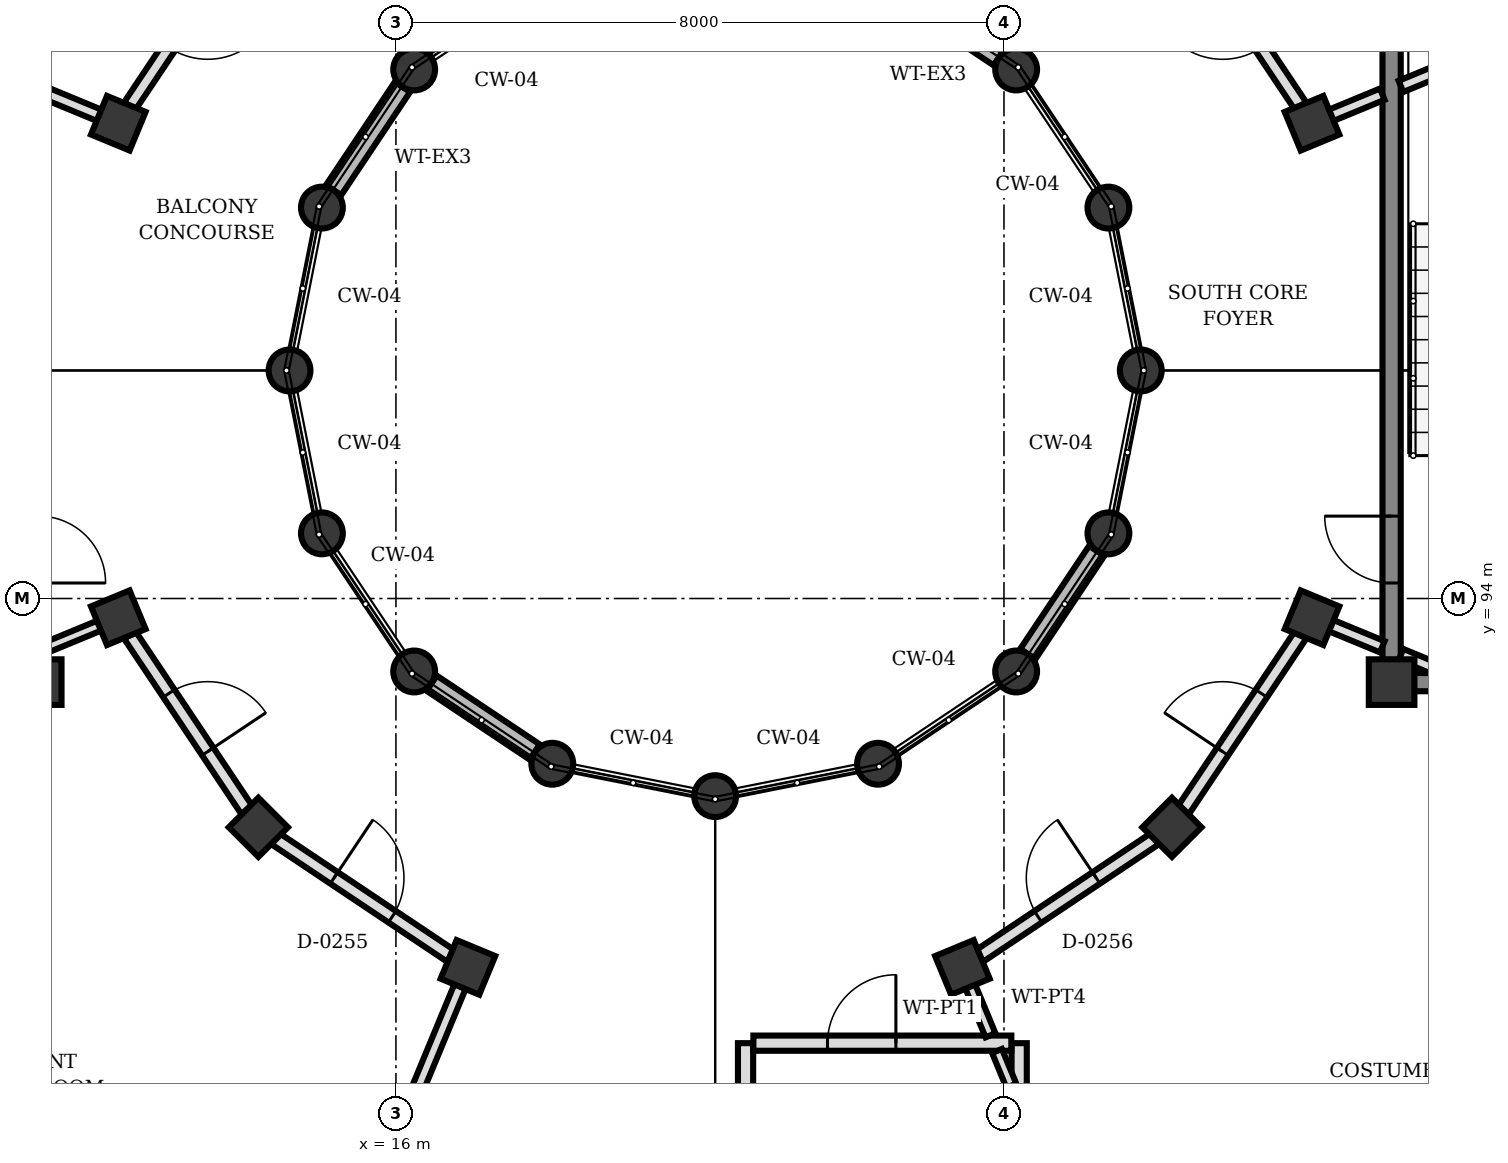
"""IFC4 building model, lengths in metres.
Left out: names, types, materials, properties, quantities, classifications, styles, units other than length and angle.
Written with IfcOpenShell. Run it as: python <this file> out.ifc"""

import sys

from ifc_helpers import new_model, si_unit, direction, frame, frame_2d, origin, origin_2d, place, context, subcontext, project, spatial, rectangle, circle, extrude, element, fill, save


model = new_model("IFC4")
c1 = context("Model", 3, precision=1e-05, world=origin(), true_north=direction((0.0, 1.0)))
c2 = subcontext(c1, "Body", "Model", "MODEL_VIEW")
j1 = project(units=[si_unit("LENGTHUNIT", "METRE"), si_unit("PLANEANGLEUNIT", "RADIAN")], contexts=[c1])
p1 = place(None, origin())
s1 = spatial("IfcSite", under=j1, at=p1, CompositionType="ELEMENT")
p2 = place(p1, origin())
s2 = spatial("IfcBuilding", under=s1, at=p2, CompositionType="ELEMENT")
p3 = place(p2, frame((0.0, 0.0, 4.5)))
s3 = spatial("IfcBuildingStorey", under=s2, at=p3, CompositionType="ELEMENT", Elevation=4.5)
for number, where, z_axis, x_axis in (
    (1, (11.3, 92.9, 0.0), (0.0, 0.0, 1.0), (1.0, 0.0, 0.0)),
    (2, (29.1, 92.9, 0.0), (0.0, 0.0, 1.0), (1.0, 0.0, 0.0)),
):
    element("IfcColumn", number, at=place(p3, frame(where, z_axis=z_axis, x_axis=x_axis)), inside=s3, PredefinedType="COLUMN", context=c2, shape_type="SweptSolid", body=[
        extrude(rectangle(XDim=0.6, YDim=0.6, at=origin_2d()), origin(), (0.0, 0.0, 1.0), 4.0),
    ])
for number, where, z_axis, x_axis in (
    (3, (25.8, 97.0, 0.0), (0.0, 0.0, 1.0), (1.0, 0.0, 0.0)),
    (4, (25.374, 99.143, 0.0), (0.0, 0.0, 1.0), (1.0, 0.0, 0.0)),
    (5, (24.16, 100.96, 0.0), (0.0, 0.0, 1.0), (1.0, 0.0, 0.0)),
    (6, (16.24, 100.96, 0.0), (0.0, 0.0, 1.0), (1.0, 0.0, 0.0)),
    (7, (15.026, 99.143, 0.0), (0.0, 0.0, 1.0), (1.0, 0.0, 0.0)),
    (8, (14.6, 97.0, 0.0), (0.0, 0.0, 1.0), (1.0, 0.0, 0.0)),
    (9, (15.026, 94.857, 0.0), (0.0, 0.0, 1.0), (1.0, 0.0, 0.0)),
    (10, (16.24, 93.04, 0.0), (0.0, 0.0, 1.0), (1.0, 0.0, 0.0)),
    (11, (18.057, 91.826, 0.0), (0.0, 0.0, 1.0), (1.0, 0.0, 0.0)),
    (12, (20.2, 91.4, 0.0), (0.0, 0.0, 1.0), (1.0, 0.0, 0.0)),
    (13, (22.343, 91.826, 0.0), (0.0, 0.0, 1.0), (1.0, 0.0, 0.0)),
    (14, (24.16, 93.04, 0.0), (0.0, 0.0, 1.0), (1.0, 0.0, 0.0)),
    (15, (25.374, 94.857, 0.0), (0.0, 0.0, 1.0), (1.0, 0.0, 0.0)),
):
    element("IfcColumn", number, at=place(p3, frame(where, z_axis=z_axis, x_axis=x_axis)), inside=s3, PredefinedType="COLUMN", context=c2, shape_type="SweptSolid", body=[
        extrude(circle(Radius=0.275, at=origin_2d()), origin(), (0.0, 0.0, 1.0), 4.0),
    ])
for number, where, z_axis, x_axis in (
    (16, (28.053, 100.253, 0.0), (0.0, 0.0, 1.0), (0.924, 0.383, 0.0)),
    (17, (12.347, 100.253, 0.0), (0.0, 0.0, 1.0), (-0.924, 0.383, 0.0)),
    (18, (12.347, 93.747, 0.0), (0.0, 0.0, 1.0), (-0.924, -0.383, 0.0)),
    (19, (14.19, 90.99, 0.0), (0.0, 0.0, 1.0), (-0.707, -0.707, 0.0)),
    (20, (16.947, 89.147, 0.0), (0.0, 0.0, 1.0), (-0.383, -0.924, 0.0)),
    (21, (23.453, 89.147, 0.0), (0.0, 0.0, 1.0), (0.383, -0.924, 0.0)),
    (22, (26.21, 90.99, 0.0), (0.0, 0.0, 1.0), (0.707, -0.707, 0.0)),
    (23, (28.053, 93.747, 0.0), (0.0, 0.0, 1.0), (0.924, -0.383, 0.0)),
):
    element("IfcColumn", number, at=place(p3, frame(where, z_axis=z_axis, x_axis=x_axis)), inside=s3, PredefinedType="COLUMN", context=c2, shape_type="SweptSolid", body=[
        extrude(rectangle(XDim=0.55, YDim=0.55, at=origin_2d()), origin(), (0.0, 0.0, 1.0), 4.0),
    ])
for number, where, z_axis, x_axis in (
    (24, (23.93, 101.114, 0.0), (0.0, 0.0, 1.0), (-0.832, 0.555, 0.0)),
    (25, (16.086, 100.73, 0.0), (0.0, 0.0, 1.0), (-0.555, -0.832, 0.0)),
    (26, (16.47, 92.886, 0.0), (0.0, 0.0, 1.0), (0.832, -0.555, 0.0)),
    (27, (24.314, 93.27, 0.0), (0.0, 0.0, 1.0), (0.555, 0.832, 0.0)),
):
    element("IfcWall", number, at=place(p3, frame(where, z_axis=z_axis, x_axis=x_axis)), inside=s3, PredefinedType="SOLIDWALL", context=c2, shape_type="SweptSolid", body=[
        extrude(rectangle(XDim=1.632, YDim=0.24, at=frame_2d((0.816, 0.0))), origin(), (0.0, 0.0, 1.0), 3.222),
    ])
p4 = place(p3, frame((29.1, 93.192, 0.0), z_axis=(0.0, 0.0, 1.0), x_axis=(0.0, 1.0, 0.0)))
e28 = element("IfcWall", 28, at=p4, inside=s3, PredefinedType="SHEAR", context=c2, shape_type="SweptSolid", body=[
    extrude(rectangle(XDim=8.136, YDim=0.24, at=frame_2d((4.068, 0.0))), origin(), (0.0, 0.0, 1.0), 3.74),
])
p5 = place(p4, frame((1.012, 0.0, 0.0)))
e29 = element("IfcOpeningElement", 29, at=p5, cuts=e28, PredefinedType="OPENING", context=c2, shape_type="SweptSolid", body=[
    extrude(rectangle(XDim=0.88, YDim=2.1, at=frame_2d((0.44, 1.05))), frame((0.0, 0.13, 0.0), z_axis=(0.0, -1.0, 0.0), x_axis=(1.0, 0.0, 0.0)), (0.0, 0.0, 1.0), 0.26),
])
p6 = place(p3, frame((33.608, 92.9, 0.0), z_axis=(0.0, 0.0, 1.0), x_axis=(-1.0, 0.0, 0.0)))
e30 = element("IfcWall", 30, at=p6, inside=s3, PredefinedType="SHEAR", context=c2, shape_type="SweptSolid", body=[
    extrude(rectangle(XDim=4.216, YDim=0.24, at=frame_2d((2.108, 0.0))), origin(), (0.0, 0.0, 1.0), 3.74),
])
p7 = place(p3, frame((20.6, 84.867, 0.0), z_axis=(0.0, 0.0, 1.0), x_axis=(0.0, 1.0, 0.0)))
e31 = element("IfcWall", 31, at=p7, inside=s3, PredefinedType="PARTITIONING", context=c2, shape_type="SweptSolid", body=[
    extrude(rectangle(XDim=3.283, YDim=0.2, at=frame_2d((1.642, 0.0))), origin(), (0.0, 0.0, 1.0), 3.7),
])
p8 = place(p3, frame((24.2, 84.703, 0.0), z_axis=(0.0, 0.0, 1.0), x_axis=(0.0, 1.0, 0.0)))
e32 = element("IfcWall", 32, at=p8, inside=s3, PredefinedType="PARTITIONING", context=c2, shape_type="SweptSolid", body=[
    extrude(rectangle(XDim=3.447, YDim=0.2, at=frame_2d((1.724, 0.0))), origin(), (0.0, 0.0, 1.0), 3.072),
])
p9 = place(p3, frame((20.703, 88.15, 0.0), z_axis=(0.0, 0.0, 1.0), x_axis=(1.0, 0.0, 0.0)))
e33 = element("IfcWall", 33, at=p9, inside=s3, PredefinedType="PARTITIONING", context=c2, shape_type="SweptSolid", body=[
    extrude(rectangle(XDim=3.394, YDim=0.2, at=frame_2d((1.697, 0.0))), origin(), (0.0, 0.0, 1.0), 3.072),
])
p10 = place(p9, frame((0.975, 0.0, 0.0)))
e34 = element("IfcOpeningElement", 34, at=p10, cuts=e33, PredefinedType="OPENING", context=c2, shape_type="SweptSolid", body=[
    extrude(rectangle(XDim=0.9, YDim=2.2, at=frame_2d((0.45, 1.1))), frame((0.0, 0.11, 0.0), z_axis=(0.0, -1.0, 0.0), x_axis=(1.0, 0.0, 0.0)), (0.0, 0.0, 1.0), 0.22),
])
p11 = place(p3, frame((28.3, 100.355, 0.0), z_axis=(0.0, 0.0, 1.0), x_axis=(0.924069600435, 0.382224245113, 0.0)))
e35 = element("IfcWall", 35, at=p11, inside=s3, PredefinedType="PARTITIONING", context=c2, shape_type="SweptSolid", body=[
    extrude(rectangle(XDim=0.733, YDim=0.16, at=frame_2d((0.366, 0.0))), origin(), (0.0, 0.0, 1.0), 3.7),
])
p12 = place(p3, frame((29.223, 100.737, 0.0), z_axis=(0.0, 0.0, 1.0), x_axis=(0.923817443679, 0.382833293686, 0.0)))
e36 = element("IfcWall", 36, at=p12, inside=s3, PredefinedType="PARTITIONING", context=c2, shape_type="SweptSolid", body=[
    extrude(rectangle(XDim=1.985, YDim=0.16, at=frame_2d((0.993, 0.0))), origin(), (0.0, 0.0, 1.0), 3.7),
])
p13 = place(p3, frame((12.1, 100.355, 0.0), z_axis=(0.0, 0.0, 1.0), x_axis=(-0.924069600435, 0.382224245113, 0.0)))
e37 = element("IfcWall", 37, at=p13, inside=s3, PredefinedType="PARTITIONING", context=c2, shape_type="SweptSolid", body=[
    extrude(rectangle(XDim=0.733, YDim=0.16, at=frame_2d((0.366, 0.0))), origin(), (0.0, 0.0, 1.0), 3.7),
])
p14 = place(p3, frame((12.1, 93.645, 0.0), z_axis=(0.0, 0.0, 1.0), x_axis=(-0.924069600435, -0.382224245113, 0.0)))
e38 = element("IfcWall", 38, at=p14, inside=s3, PredefinedType="PARTITIONING", context=c2, shape_type="SweptSolid", body=[
    extrude(rectangle(XDim=0.733, YDim=0.14, at=frame_2d((0.366, 0.0))), origin(), (0.0, 0.0, 1.0), 3.072),
])
p15 = place(p3, frame((16.845, 88.9, 0.0), z_axis=(0.0, 0.0, 1.0), x_axis=(-0.382683896966, -0.923879340067, 0.0)))
e39 = element("IfcWall", 39, at=p15, inside=s3, PredefinedType="PARTITIONING", context=c2, shape_type="SweptSolid", body=[
    extrude(rectangle(XDim=8.44, YDim=0.16, at=frame_2d((4.22, 0.0))), origin(), (0.0, 0.0, 1.0), 3.072),
])
p16 = place(p3, frame((23.555, 88.9, 0.0), z_axis=(0.0, 0.0, 1.0), x_axis=(0.38278283439, -0.923838352579, 0.0)))
e40 = element("IfcWall", 40, at=p16, inside=s3, PredefinedType="PARTITIONING", context=c2, shape_type="SweptSolid", body=[
    extrude(rectangle(XDim=0.7, YDim=0.14, at=frame_2d((0.35, 0.0))), origin(), (0.0, 0.0, 1.0), 3.072),
])
p17 = place(p3, frame((23.908, 88.047, 0.0), z_axis=(0.0, 0.0, 1.0), x_axis=(0.3827885685, -0.92383597669, 0.0)))
e41 = element("IfcWall", 41, at=p17, inside=s3, PredefinedType="PARTITIONING", context=c2, shape_type="SweptSolid", body=[
    extrude(rectangle(XDim=0.494, YDim=0.14, at=frame_2d((0.247, 0.0))), origin(), (0.0, 0.0, 1.0), 3.072),
])
p18 = place(p3, frame((28.3, 93.645, 0.0), z_axis=(0.0, 0.0, 1.0), x_axis=(0.924069600435, -0.382224245113, 0.0)))
e42 = element("IfcWall", 42, at=p18, inside=s3, PredefinedType="PARTITIONING", context=c2, shape_type="SweptSolid", body=[
    extrude(rectangle(XDim=0.733, YDim=0.16, at=frame_2d((0.366, 0.0))), origin(), (0.0, 0.0, 1.0), 3.072),
])
p19 = place(p3, frame((29.223, 93.263, 0.0), z_axis=(0.0, 0.0, 1.0), x_axis=(0.923812676193, -0.382844797933, 0.0)))
e43 = element("IfcWall", 43, at=p19, inside=s3, PredefinedType="PARTITIONING", context=c2, shape_type="SweptSolid", body=[
    extrude(rectangle(XDim=0.627, YDim=0.16, at=frame_2d((0.313, 0.0))), origin(), (0.0, 0.0, 1.0), 3.072),
])
p20 = place(p3, frame((27.902, 100.479, 0.0), z_axis=(0.0, 0.0, 1.0), x_axis=(-0.555797002478, 0.831318045056, 0.0)))
e44 = element("IfcWall", 44, at=p20, inside=s3, PredefinedType="PARTITIONING", context=c2, shape_type="SweptSolid", body=[
    extrude(rectangle(XDim=2.773, YDim=0.18, at=frame_2d((1.386, 0.0))), origin(), (0.0, 0.0, 1.0), 3.072),
])
p21 = place(p20, frame((0.926, 0.0, 0.0)))
e45 = element("IfcOpeningElement", 45, at=p21, cuts=e44, PredefinedType="OPENING", context=c2, shape_type="SweptSolid", body=[
    extrude(rectangle(XDim=0.92, YDim=2.1, at=frame_2d((0.46, 1.05))), frame((0.0, 0.1, 0.0), z_axis=(0.0, -1.0, 0.0), x_axis=(1.0, 0.0, 0.0)), (0.0, 0.0, 1.0), 0.2),
])
p22 = place(p3, frame((14.039, 102.784, 0.0), z_axis=(0.0, 0.0, 1.0), x_axis=(-0.555797002478, -0.831318045056, 0.0)))
e46 = element("IfcWall", 46, at=p22, inside=s3, PredefinedType="PARTITIONING", context=c2, shape_type="SweptSolid", body=[
    extrude(rectangle(XDim=2.773, YDim=0.18, at=frame_2d((1.386, 0.0))), origin(), (0.0, 0.0, 1.0), 3.072),
])
p23 = place(p22, frame((0.926, 0.0, 0.0)))
e47 = element("IfcOpeningElement", 47, at=p23, cuts=e46, PredefinedType="OPENING", context=c2, shape_type="SweptSolid", body=[
    extrude(rectangle(XDim=0.92, YDim=2.1, at=frame_2d((0.46, 1.05))), frame((0.0, 0.1, 0.0), z_axis=(0.0, -1.0, 0.0), x_axis=(1.0, 0.0, 0.0)), (0.0, 0.0, 1.0), 0.2),
])
p24 = place(p3, frame((12.498, 93.521, 0.0), z_axis=(0.0, 0.0, 1.0), x_axis=(0.555797002478, -0.831318045056, 0.0)))
e48 = element("IfcWall", 48, at=p24, inside=s3, PredefinedType="PARTITIONING", context=c2, shape_type="SweptSolid", body=[
    extrude(rectangle(XDim=2.773, YDim=0.18, at=frame_2d((1.386, 0.0))), origin(), (0.0, 0.0, 1.0), 3.072),
])
p25 = place(p24, frame((0.926, 0.0, 0.0)))
e49 = element("IfcOpeningElement", 49, at=p25, cuts=e48, PredefinedType="OPENING", context=c2, shape_type="SweptSolid", body=[
    extrude(rectangle(XDim=0.92, YDim=2.1, at=frame_2d((0.46, 1.05))), frame((0.0, 0.1, 0.0), z_axis=(0.0, -1.0, 0.0), x_axis=(1.0, 0.0, 0.0)), (0.0, 0.0, 1.0), 0.2),
])
p26 = place(p3, frame((14.416, 90.839, 0.0), z_axis=(0.0, 0.0, 1.0), x_axis=(0.831318045056, -0.555797002478, 0.0)))
e50 = element("IfcWall", 50, at=p26, inside=s3, PredefinedType="PARTITIONING", context=c2, shape_type="SweptSolid", body=[
    extrude(rectangle(XDim=2.773, YDim=0.18, at=frame_2d((1.386, 0.0))), origin(), (0.0, 0.0, 1.0), 3.072),
])
p27 = place(p26, frame((0.926, 0.0, 0.0)))
e51 = element("IfcOpeningElement", 51, at=p27, cuts=e50, PredefinedType="OPENING", context=c2, shape_type="SweptSolid", body=[
    extrude(rectangle(XDim=0.92, YDim=2.1, at=frame_2d((0.46, 1.05))), frame((0.0, 0.1, 0.0), z_axis=(0.0, -1.0, 0.0), x_axis=(1.0, 0.0, 0.0)), (0.0, 0.0, 1.0), 0.2),
])
p28 = place(p3, frame((23.679, 89.298, 0.0), z_axis=(0.0, 0.0, 1.0), x_axis=(0.831318045056, 0.555797002478, 0.0)))
e52 = element("IfcWall", 52, at=p28, inside=s3, PredefinedType="PARTITIONING", context=c2, shape_type="SweptSolid", body=[
    extrude(rectangle(XDim=2.773, YDim=0.18, at=frame_2d((1.386, 0.0))), origin(), (0.0, 0.0, 1.0), 3.072),
])
p29 = place(p28, frame((0.926, 0.0, 0.0)))
e53 = element("IfcOpeningElement", 53, at=p29, cuts=e52, PredefinedType="OPENING", context=c2, shape_type="SweptSolid", body=[
    extrude(rectangle(XDim=0.92, YDim=2.1, at=frame_2d((0.46, 1.05))), frame((0.0, 0.1, 0.0), z_axis=(0.0, -1.0, 0.0), x_axis=(1.0, 0.0, 0.0)), (0.0, 0.0, 1.0), 0.2),
])
p30 = place(p3, frame((26.361, 91.216, 0.0), z_axis=(0.0, 0.0, 1.0), x_axis=(0.555797002478, 0.831318045056, 0.0)))
e54 = element("IfcWall", 54, at=p30, inside=s3, PredefinedType="PARTITIONING", context=c2, shape_type="SweptSolid", body=[
    extrude(rectangle(XDim=2.773, YDim=0.18, at=frame_2d((1.386, 0.0))), origin(), (0.0, 0.0, 1.0), 3.072),
])
p31 = place(p30, frame((0.926, 0.0, 0.0)))
e55 = element("IfcOpeningElement", 55, at=p31, cuts=e54, PredefinedType="OPENING", context=c2, shape_type="SweptSolid", body=[
    extrude(rectangle(XDim=0.92, YDim=2.1, at=frame_2d((0.46, 1.05))), frame((0.0, 0.1, 0.0), z_axis=(0.0, -1.0, 0.0), x_axis=(1.0, 0.0, 0.0)), (0.0, 0.0, 1.0), 0.2),
])
p32 = place(p5, origin())
e56 = element("IfcDoor", 56, at=p32, inside=s3, OperationType="SINGLE_SWING_RIGHT", PredefinedType="DOOR", context=c2, shape_type="SweptSolid", body=[
    extrude(rectangle(XDim=0.88, YDim=2.1, at=frame_2d((0.44, 1.05))), frame((0.0, 0.025, 0.0), z_axis=(0.0, -1.0, 0.0), x_axis=(1.0, 0.0, 0.0)), (0.0, 0.0, 1.0), 0.05),
])
fill(e29, e56)
p33 = place(p10, origin())
e57 = element("IfcDoor", 57, at=p33, inside=s3, OperationType="SINGLE_SWING_RIGHT", PredefinedType="DOOR", context=c2, shape_type="SweptSolid", body=[
    extrude(rectangle(XDim=0.9, YDim=2.2, at=frame_2d((0.45, 1.1))), frame((0.0, 0.025, 0.0), z_axis=(0.0, -1.0, 0.0), x_axis=(1.0, 0.0, 0.0)), (0.0, 0.0, 1.0), 0.05),
])
fill(e34, e57)
p34 = place(p25, origin())
e58 = element("IfcDoor", 58, at=p34, inside=s3, OperationType="SINGLE_SWING_RIGHT", PredefinedType="DOOR", context=c2, shape_type="SweptSolid", body=[
    extrude(rectangle(XDim=0.92, YDim=2.1, at=frame_2d((0.46, 1.05))), frame((0.0, 0.025, 0.0), z_axis=(0.0, -1.0, 0.0), x_axis=(1.0, 0.0, 0.0)), (0.0, 0.0, 1.0), 0.05),
])
fill(e49, e58)
p35 = place(p27, origin())
e59 = element("IfcDoor", 59, at=p35, inside=s3, OperationType="SINGLE_SWING_LEFT", PredefinedType="DOOR", context=c2, shape_type="SweptSolid", body=[
    extrude(rectangle(XDim=0.92, YDim=2.1, at=frame_2d((0.46, 1.05))), frame((0.0, 0.025, 0.0), z_axis=(0.0, -1.0, 0.0), x_axis=(1.0, 0.0, 0.0)), (0.0, 0.0, 1.0), 0.05),
])
fill(e51, e59)
p36 = place(p29, origin())
e60 = element("IfcDoor", 60, at=p36, inside=s3, OperationType="SINGLE_SWING_RIGHT", PredefinedType="DOOR", context=c2, shape_type="SweptSolid", body=[
    extrude(rectangle(XDim=0.92, YDim=2.1, at=frame_2d((0.46, 1.05))), frame((0.0, 0.025, 0.0), z_axis=(0.0, -1.0, 0.0), x_axis=(1.0, 0.0, 0.0)), (0.0, 0.0, 1.0), 0.05),
])
fill(e53, e60)
p37 = place(p31, origin())
e61 = element("IfcDoor", 61, at=p37, inside=s3, OperationType="SINGLE_SWING_LEFT", PredefinedType="DOOR", context=c2, shape_type="SweptSolid", body=[
    extrude(rectangle(XDim=0.92, YDim=2.1, at=frame_2d((0.46, 1.05))), frame((0.0, 0.025, 0.0), z_axis=(0.0, -1.0, 0.0), x_axis=(1.0, 0.0, 0.0)), (0.0, 0.0, 1.0), 0.05),
])
fill(e55, e61)
save(model, sys.argv[1])
